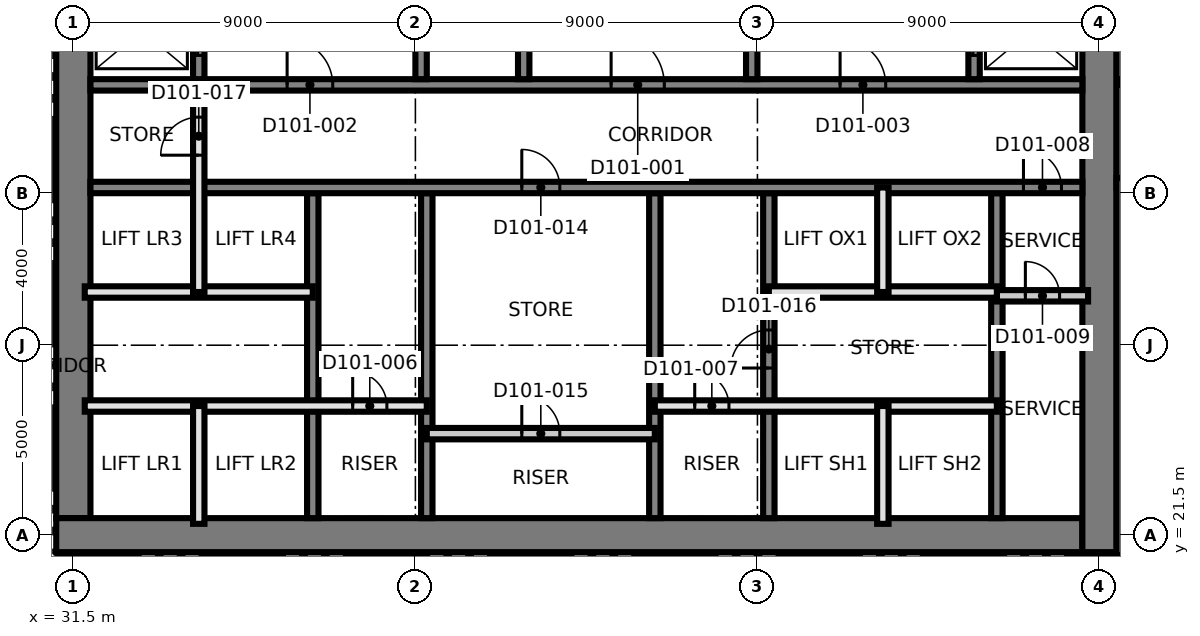
"""IFC4 building model, lengths in metres.
Left out: names, types, materials, properties, quantities, classifications, styles, units other than length and angle.
Written with IfcOpenShell. Run it as: python <this file> out.ifc"""

import sys

from ifc_helpers import new_model, si_unit, direction, frame, frame_2d, origin, place, context, subcontext, project, spatial, rectangle, extrude, element, fill, save


model = new_model("IFC4")
c1 = context("Model", 3, precision=1e-05, world=origin(), true_north=direction((0.0, 1.0)))
c2 = subcontext(c1, "Body", "Model", "MODEL_VIEW")
j1 = project(units=[si_unit("LENGTHUNIT", "METRE"), si_unit("PLANEANGLEUNIT", "RADIAN")], contexts=[c1])
p1 = place(None, origin())
s1 = spatial("IfcSite", under=j1, at=p1, CompositionType="ELEMENT")
p2 = place(p1, origin())
s2 = spatial("IfcBuilding", under=s1, at=p2, CompositionType="ELEMENT")
p3 = place(p2, frame((0.0, 0.0, -4.5)))
s3 = spatial("IfcBuildingStorey", under=s2, at=p3, CompositionType="ELEMENT", Elevation=-4.5)
p4 = place(p3, frame((31.5, 21.95, 0.0), z_axis=(0.0, 0.0, 1.0), x_axis=(0.0, 1.0, 0.0)))
e1 = element("IfcWall", 1, at=p4, inside=s3, PredefinedType="SHEAR", context=c2, shape_type="SweptSolid", body=[
    extrude(rectangle(XDim=17.1, YDim=0.9, at=frame_2d((8.55, 0.0))), origin(), (0.0, 0.0, 1.0), 4.5),
])
p5 = place(p3, frame((31.05, 21.5, 0.0), z_axis=(0.0, 0.0, 1.0), x_axis=(1.0, 0.0, 0.0)))
e2 = element("IfcWall", 2, at=p5, inside=s3, PredefinedType="SHEAR", context=c2, shape_type="SweptSolid", body=[
    extrude(rectangle(XDim=27.0, YDim=0.9, at=frame_2d((13.5, 0.0))), origin(), (0.0, 0.0, 1.0), 4.5),
])
p6 = place(p3, frame((58.5, 21.05, 0.0), z_axis=(0.0, 0.0, 1.0), x_axis=(0.0, 1.0, 0.0)))
e3 = element("IfcWall", 3, at=p6, inside=s3, PredefinedType="SHEAR", context=c2, shape_type="SweptSolid", body=[
    extrude(rectangle(XDim=18.9, YDim=0.9, at=frame_2d((9.45, 0.0))), origin(), (0.0, 0.0, 1.0), 4.5),
])
for number, where, z_axis, x_axis in (
    (4, (37.8, 21.95, 0.0), (0.0, 0.0, 1.0), (0.0, 1.0, 0.0)),
    (5, (40.8, 21.95, 0.0), (0.0, 0.0, 1.0), (0.0, 1.0, 0.0)),
    (6, (46.8, 21.95, 0.0), (0.0, 0.0, 1.0), (0.0, 1.0, 0.0)),
):
    element("IfcWall", number, at=place(p3, frame(where, z_axis=z_axis, x_axis=x_axis)), inside=s3, PredefinedType="SHEAR", context=c2, shape_type="SweptSolid", body=[
        extrude(rectangle(XDim=8.55, YDim=0.3, at=frame_2d((4.275, 0.0))), origin(), (0.0, 0.0, 1.0), 4.5),
    ])
p7 = place(p3, frame((49.8, 21.95, 0.0), z_axis=(0.0, 0.0, 1.0), x_axis=(0.0, 1.0, 0.0)))
e7 = element("IfcWall", 7, at=p7, inside=s3, PredefinedType="SHEAR", context=c2, shape_type="SweptSolid", body=[
    extrude(rectangle(XDim=8.55, YDim=0.3, at=frame_2d((4.275, 0.0))), origin(), (0.0, 0.0, 1.0), 4.5),
])
p8 = place(p7, frame((3.95, 0.0, 0.0)))
e8 = element("IfcOpeningElement", 8, at=p8, cuts=e7, PredefinedType="OPENING", context=c2, shape_type="SweptSolid", body=[
    extrude(rectangle(XDim=1.0, YDim=2.1, at=frame_2d((0.5, 1.05))), frame((0.0, 0.16, 0.0), z_axis=(0.0, -1.0, 0.0), x_axis=(1.0, 0.0, 0.0)), (0.0, 0.0, 1.0), 0.32),
])
p9 = place(p3, frame((55.8, 21.95, 0.0), z_axis=(0.0, 0.0, 1.0), x_axis=(0.0, 1.0, 0.0)))
e9 = element("IfcWall", 9, at=p9, inside=s3, PredefinedType="SHEAR", context=c2, shape_type="SweptSolid", body=[
    extrude(rectangle(XDim=8.55, YDim=0.3, at=frame_2d((4.275, 0.0))), origin(), (0.0, 0.0, 1.0), 4.5),
])
p10 = place(p3, frame((31.95, 30.65, 0.0), z_axis=(0.0, 0.0, 1.0), x_axis=(1.0, 0.0, 0.0)))
e10 = element("IfcWall", 10, at=p10, inside=s3, PredefinedType="SHEAR", context=c2, shape_type="SweptSolid", body=[
    extrude(rectangle(XDim=26.1, YDim=0.3, at=frame_2d((13.05, 0.0))), origin(), (0.0, 0.0, 1.0), 4.5),
])
p11 = place(p10, frame((24.55, 0.0, 0.0)))
e11 = element("IfcOpeningElement", 11, at=p11, cuts=e10, PredefinedType="OPENING", context=c2, shape_type="SweptSolid", body=[
    extrude(rectangle(XDim=1.0, YDim=2.1, at=frame_2d((0.5, 1.05))), frame((0.0, 0.16, 0.0), z_axis=(0.0, -1.0, 0.0), x_axis=(1.0, 0.0, 0.0)), (0.0, 0.0, 1.0), 0.32),
])
p12 = place(p10, frame((11.35, 0.0, 0.0)))
e12 = element("IfcOpeningElement", 12, at=p12, cuts=e10, PredefinedType="OPENING", context=c2, shape_type="SweptSolid", body=[
    extrude(rectangle(XDim=1.0, YDim=2.1, at=frame_2d((0.5, 1.05))), frame((0.0, 0.16, 0.0), z_axis=(0.0, -1.0, 0.0), x_axis=(1.0, 0.0, 0.0)), (0.0, 0.0, 1.0), 0.32),
])
p13 = place(p3, frame((31.95, 33.35, 0.0), z_axis=(0.0, 0.0, 1.0), x_axis=(1.0, 0.0, 0.0)))
e13 = element("IfcWall", 13, at=p13, inside=s3, PredefinedType="SHEAR", context=c2, shape_type="SweptSolid", body=[
    extrude(rectangle(XDim=26.1, YDim=0.3, at=frame_2d((13.05, 0.0))), origin(), (0.0, 0.0, 1.0), 4.5),
])
p14 = place(p13, frame((13.7, 0.0, 0.0)))
e14 = element("IfcOpeningElement", 14, at=p14, cuts=e13, PredefinedType="OPENING", context=c2, shape_type="SweptSolid", body=[
    extrude(rectangle(XDim=1.4, YDim=2.1, at=frame_2d((0.7, 1.05))), frame((0.0, 0.16, 0.0), z_axis=(0.0, -1.0, 0.0), x_axis=(1.0, 0.0, 0.0)), (0.0, 0.0, 1.0), 0.32),
])
p15 = place(p13, frame((5.175, 0.0, 0.0)))
e15 = element("IfcOpeningElement", 15, at=p15, cuts=e13, PredefinedType="OPENING", context=c2, shape_type="SweptSolid", body=[
    extrude(rectangle(XDim=1.2, YDim=2.1, at=frame_2d((0.6, 1.05))), frame((0.0, 0.16, 0.0), z_axis=(0.0, -1.0, 0.0), x_axis=(1.0, 0.0, 0.0)), (0.0, 0.0, 1.0), 0.32),
])
p16 = place(p13, frame((19.725, 0.0, 0.0)))
e16 = element("IfcOpeningElement", 16, at=p16, cuts=e13, PredefinedType="OPENING", context=c2, shape_type="SweptSolid", body=[
    extrude(rectangle(XDim=1.2, YDim=2.1, at=frame_2d((0.6, 1.05))), frame((0.0, 0.16, 0.0), z_axis=(0.0, -1.0, 0.0), x_axis=(1.0, 0.0, 0.0)), (0.0, 0.0, 1.0), 0.32),
])
for number, where, z_axis, x_axis in (
    (17, (40.65, 33.5, 0.0), (0.0, 0.0, 1.0), (0.0, 1.0, 0.0)),
    (18, (43.35, 33.5, 0.0), (0.0, 0.0, 1.0), (0.0, 1.0, 0.0)),
):
    element("IfcWall", number, at=place(p3, frame(where, z_axis=z_axis, x_axis=x_axis)), inside=s3, PredefinedType="SHEAR", context=c2, shape_type="SweptSolid", body=[
        extrude(rectangle(XDim=5.55, YDim=0.3, at=frame_2d((2.775, 0.0))), origin(), (0.0, 0.0, 1.0), 4.5),
    ])
p17 = place(p3, frame((34.8, 33.5, 0.0), z_axis=(0.0, 0.0, 1.0), x_axis=(0.0, 1.0, 0.0)))
e19 = element("IfcWall", 19, at=p17, inside=s3, PredefinedType="SHEAR", context=c2, shape_type="SweptSolid", body=[
    extrude(rectangle(XDim=2.55, YDim=0.3, at=frame_2d((1.275, 0.0))), origin(), (0.0, 0.0, 1.0), 4.5),
])
p18 = place(p17, frame((0.625, 0.0, 0.0)))
e20 = element("IfcOpeningElement", 20, at=p18, cuts=e19, PredefinedType="OPENING", context=c2, shape_type="SweptSolid", body=[
    extrude(rectangle(XDim=1.3, YDim=2.4, at=frame_2d((0.65, 1.2))), frame((0.0, 0.16, 0.0), z_axis=(0.0, -1.0, 0.0), x_axis=(1.0, 0.0, 0.0)), (0.0, 0.0, 1.0), 0.32),
])
p19 = place(p3, frame((49.35, 33.5, 0.0), z_axis=(0.0, 0.0, 1.0), x_axis=(0.0, 1.0, 0.0)))
e21 = element("IfcWall", 21, at=p19, inside=s3, PredefinedType="SHEAR", context=c2, shape_type="SweptSolid", body=[
    extrude(rectangle(XDim=5.55, YDim=0.3, at=frame_2d((2.775, 0.0))), origin(), (0.0, 0.0, 1.0), 4.5),
])
p20 = place(p3, frame((55.2, 33.5, 0.0), z_axis=(0.0, 0.0, 1.0), x_axis=(0.0, 1.0, 0.0)))
e22 = element("IfcWall", 22, at=p20, inside=s3, PredefinedType="SHEAR", context=c2, shape_type="SweptSolid", body=[
    extrude(rectangle(XDim=2.55, YDim=0.3, at=frame_2d((1.275, 0.0))), origin(), (0.0, 0.0, 1.0), 4.5),
])
p21 = place(p20, frame((0.625, 0.0, 0.0)))
e23 = element("IfcOpeningElement", 23, at=p21, cuts=e22, PredefinedType="OPENING", context=c2, shape_type="SweptSolid", body=[
    extrude(rectangle(XDim=1.3, YDim=2.4, at=frame_2d((0.65, 1.2))), frame((0.0, 0.16, 0.0), z_axis=(0.0, -1.0, 0.0), x_axis=(1.0, 0.0, 0.0)), (0.0, 0.0, 1.0), 0.32),
])
p22 = place(p3, frame((40.8, 24.173, 0.0), z_axis=(0.0, 0.0, 1.0), x_axis=(1.0, 0.0, 0.0)))
e24 = element("IfcWall", 24, at=p22, inside=s3, PredefinedType="PARTITIONING", context=c2, shape_type="SweptSolid", body=[
    extrude(rectangle(XDim=6.0, YDim=0.3, at=frame_2d((3.0, 0.0))), origin(), (0.0, 0.0, 1.0), 4.2),
])
p23 = place(p22, frame((2.5, 0.0, 0.0)))
e25 = element("IfcOpeningElement", 25, at=p23, cuts=e24, PredefinedType="OPENING", context=c2, shape_type="SweptSolid", body=[
    extrude(rectangle(XDim=1.0, YDim=2.1, at=frame_2d((0.5, 1.05))), frame((0.0, 0.16, 0.0), z_axis=(0.0, -1.0, 0.0), x_axis=(1.0, 0.0, 0.0)), (0.0, 0.0, 1.0), 0.32),
])
p24 = place(p3, frame((31.8, 24.9, 0.0), z_axis=(0.0, 0.0, 1.0), x_axis=(1.0, 0.0, 0.0)))
e26 = element("IfcWall", 26, at=p24, inside=s3, PredefinedType="SOLIDWALL", context=c2, shape_type="SweptSolid", body=[
    extrude(rectangle(XDim=9.0, YDim=0.3, at=frame_2d((4.5, 0.0))), origin(), (0.0, 0.0, 1.0), 4.2),
])
p25 = place(p24, frame((7.05, 0.0, 0.0)))
e27 = element("IfcOpeningElement", 27, at=p25, cuts=e26, PredefinedType="OPENING", context=c2, shape_type="SweptSolid", body=[
    extrude(rectangle(XDim=0.9, YDim=2.1, at=frame_2d((0.45, 1.05))), frame((0.0, 0.16, 0.0), z_axis=(0.0, -1.0, 0.0), x_axis=(1.0, 0.0, 0.0)), (0.0, 0.0, 1.0), 0.32),
])
p26 = place(p3, frame((46.8, 24.9, 0.0), z_axis=(0.0, 0.0, 1.0), x_axis=(1.0, 0.0, 0.0)))
e28 = element("IfcWall", 28, at=p26, inside=s3, PredefinedType="SOLIDWALL", context=c2, shape_type="SweptSolid", body=[
    extrude(rectangle(XDim=9.0, YDim=0.3, at=frame_2d((4.5, 0.0))), origin(), (0.0, 0.0, 1.0), 4.2),
])
p27 = place(p26, frame((1.05, 0.0, 0.0)))
e29 = element("IfcOpeningElement", 29, at=p27, cuts=e28, PredefinedType="OPENING", context=c2, shape_type="SweptSolid", body=[
    extrude(rectangle(XDim=0.9, YDim=2.1, at=frame_2d((0.45, 1.05))), frame((0.0, 0.16, 0.0), z_axis=(0.0, -1.0, 0.0), x_axis=(1.0, 0.0, 0.0)), (0.0, 0.0, 1.0), 0.32),
])
p28 = place(p3, frame((55.8, 27.8, 0.0), z_axis=(0.0, 0.0, 1.0), x_axis=(1.0, 0.0, 0.0)))
e30 = element("IfcWall", 30, at=p28, inside=s3, PredefinedType="PARTITIONING", context=c2, shape_type="SweptSolid", body=[
    extrude(rectangle(XDim=2.4, YDim=0.3, at=frame_2d((1.2, 0.0))), origin(), (0.0, 0.0, 1.0), 4.2),
])
p29 = place(p28, frame((0.75, 0.0, 0.0)))
e31 = element("IfcOpeningElement", 31, at=p29, cuts=e30, PredefinedType="OPENING", context=c2, shape_type="SweptSolid", body=[
    extrude(rectangle(XDim=0.9, YDim=2.1, at=frame_2d((0.45, 1.05))), frame((0.0, 0.16, 0.0), z_axis=(0.0, -1.0, 0.0), x_axis=(1.0, 0.0, 0.0)), (0.0, 0.0, 1.0), 0.32),
])
for number, where, z_axis, x_axis in (
    (32, (31.8, 27.9, 0.0), (0.0, 0.0, 1.0), (1.0, 0.0, 0.0)),
    (33, (49.8, 27.9, 0.0), (0.0, 0.0, 1.0), (1.0, 0.0, 0.0)),
):
    element("IfcWall", number, at=place(p3, frame(where, z_axis=z_axis, x_axis=x_axis)), inside=s3, PredefinedType="SOLIDWALL", context=c2, shape_type="SweptSolid", body=[
        extrude(rectangle(XDim=6.0, YDim=0.3, at=frame_2d((3.0, 0.0))), origin(), (0.0, 0.0, 1.0), 4.2),
    ])
p30 = place(p3, frame((34.8, 21.8, 0.0), z_axis=(0.0, 0.0, 1.0), x_axis=(0.0, 1.0, 0.0)))
e34 = element("IfcWall", 34, at=p30, inside=s3, PredefinedType="SOLIDWALL", context=c2, shape_type="SweptSolid", body=[
    extrude(rectangle(XDim=3.1, YDim=0.3, at=frame_2d((1.55, 0.0))), origin(), (0.0, 0.0, 1.0), 4.2),
])
p31 = place(p3, frame((34.8, 27.9, 0.0), z_axis=(0.0, 0.0, 1.0), x_axis=(0.0, 1.0, 0.0)))
e35 = element("IfcWall", 35, at=p31, inside=s3, PredefinedType="SOLIDWALL", context=c2, shape_type="SweptSolid", body=[
    extrude(rectangle(XDim=5.45, YDim=0.3, at=frame_2d((2.725, 0.0))), origin(), (0.0, 0.0, 1.0), 4.2),
])
p32 = place(p31, frame((3.6, 0.0, 0.0)))
e36 = element("IfcOpeningElement", 36, at=p32, cuts=e35, PredefinedType="OPENING", context=c2, shape_type="SweptSolid", body=[
    extrude(rectangle(XDim=1.0, YDim=2.1, at=frame_2d((0.5, 1.05))), frame((0.0, 0.16, 0.0), z_axis=(0.0, -1.0, 0.0), x_axis=(1.0, 0.0, 0.0)), (0.0, 0.0, 1.0), 0.32),
])
p33 = place(p3, frame((52.8, 21.8, 0.0), z_axis=(0.0, 0.0, 1.0), x_axis=(0.0, 1.0, 0.0)))
e37 = element("IfcWall", 37, at=p33, inside=s3, PredefinedType="SOLIDWALL", context=c2, shape_type="SweptSolid", body=[
    extrude(rectangle(XDim=3.1, YDim=0.3, at=frame_2d((1.55, 0.0))), origin(), (0.0, 0.0, 1.0), 4.2),
])
p34 = place(p3, frame((52.8, 27.9, 0.0), z_axis=(0.0, 0.0, 1.0), x_axis=(0.0, 1.0, 0.0)))
e38 = element("IfcWall", 38, at=p34, inside=s3, PredefinedType="SOLIDWALL", context=c2, shape_type="SweptSolid", body=[
    extrude(rectangle(XDim=2.75, YDim=0.3, at=frame_2d((1.375, 0.0))), origin(), (0.0, 0.0, 1.0), 4.2),
])
p35 = place(p3, frame((59.1, 30.65, 0.0), z_axis=(0.0, 0.0, 1.0), x_axis=(0.0, 1.0, 0.0)))
e39 = element("IfcWall", 39, at=p35, inside=s3, PredefinedType="PARTITIONING", context=c2, shape_type="SweptSolid", body=[
    extrude(rectangle(XDim=2.7, YDim=0.3, at=frame_2d((1.35, 0.0))), origin(), (0.0, 0.0, 1.0), 4.2),
])
p36 = place(p3, frame((31.15, 20.95, 0.0), z_axis=(0.0, 0.0, 1.0), x_axis=(1.0, 0.0, 0.0)))
e40 = element("IfcWall", 40, at=p36, inside=s3, PredefinedType="PARTITIONING", context=c2, shape_type="SweptSolid", body=[
    extrude(rectangle(XDim=27.9, YDim=0.2, at=frame_2d((13.95, 0.0))), origin(), (0.0, 0.0, 1.0), 4.2),
])
p37 = place(p3, frame((59.05, 20.95, 0.0), z_axis=(0.0, 0.0, 1.0), x_axis=(0.0, 1.0, 0.0)))
e41 = element("IfcWall", 41, at=p37, inside=s3, PredefinedType="PARTITIONING", context=c2, shape_type="SweptSolid", body=[
    extrude(rectangle(XDim=9.95, YDim=0.2, at=frame_2d((4.975, 0.0))), origin(), (0.0, 0.0, 1.0), 4.2),
])
p38 = place(p3, frame((59.05, 33.5, 0.0), z_axis=(0.0, 0.0, 1.0), x_axis=(0.0, 1.0, 0.0)))
e42 = element("IfcWall", 42, at=p38, inside=s3, PredefinedType="PARTITIONING", context=c2, shape_type="SweptSolid", body=[
    extrude(rectangle(XDim=6.35, YDim=0.2, at=frame_2d((3.175, 0.0))), origin(), (0.0, 0.0, 1.0), 4.2),
])
p39 = place(p14, origin())
e43 = element("IfcDoor", 43, at=p39, inside=s3, OperationType="SINGLE_SWING_RIGHT", PredefinedType="DOOR", context=c2, shape_type="SweptSolid", body=[
    extrude(rectangle(XDim=1.4, YDim=2.1, at=frame_2d((0.7, 1.05))), frame((0.0, 0.025, 0.0), z_axis=(0.0, -1.0, 0.0), x_axis=(1.0, 0.0, 0.0)), (0.0, 0.0, 1.0), 0.05),
])
fill(e14, e43)
p40 = place(p15, origin())
e44 = element("IfcDoor", 44, at=p40, inside=s3, OperationType="SINGLE_SWING_LEFT", PredefinedType="DOOR", context=c2, shape_type="SweptSolid", body=[
    extrude(rectangle(XDim=1.2, YDim=2.1, at=frame_2d((0.6, 1.05))), frame((0.0, 0.025, 0.0), z_axis=(0.0, -1.0, 0.0), x_axis=(1.0, 0.0, 0.0)), (0.0, 0.0, 1.0), 0.05),
])
fill(e15, e44)
p41 = place(p16, origin())
e45 = element("IfcDoor", 45, at=p41, inside=s3, OperationType="SINGLE_SWING_RIGHT", PredefinedType="DOOR", context=c2, shape_type="SweptSolid", body=[
    extrude(rectangle(XDim=1.2, YDim=2.1, at=frame_2d((0.6, 1.05))), frame((0.0, 0.025, 0.0), z_axis=(0.0, -1.0, 0.0), x_axis=(1.0, 0.0, 0.0)), (0.0, 0.0, 1.0), 0.05),
])
fill(e16, e45)
p42 = place(p25, origin())
e46 = element("IfcDoor", 46, at=p42, inside=s3, OperationType="SINGLE_SWING_LEFT", PredefinedType="DOOR", context=c2, shape_type="SweptSolid", body=[
    extrude(rectangle(XDim=0.9, YDim=2.1, at=frame_2d((0.45, 1.05))), frame((0.0, 0.025, 0.0), z_axis=(0.0, -1.0, 0.0), x_axis=(1.0, 0.0, 0.0)), (0.0, 0.0, 1.0), 0.05),
])
fill(e27, e46)
p43 = place(p27, origin())
e47 = element("IfcDoor", 47, at=p43, inside=s3, OperationType="SINGLE_SWING_RIGHT", PredefinedType="DOOR", context=c2, shape_type="SweptSolid", body=[
    extrude(rectangle(XDim=0.9, YDim=2.1, at=frame_2d((0.45, 1.05))), frame((0.0, 0.025, 0.0), z_axis=(0.0, -1.0, 0.0), x_axis=(1.0, 0.0, 0.0)), (0.0, 0.0, 1.0), 0.05),
])
fill(e29, e47)
p44 = place(p11, origin())
e48 = element("IfcDoor", 48, at=p44, inside=s3, OperationType="SINGLE_SWING_LEFT", PredefinedType="DOOR", context=c2, shape_type="SweptSolid", body=[
    extrude(rectangle(XDim=1.0, YDim=2.1, at=frame_2d((0.5, 1.05))), frame((0.0, 0.025, 0.0), z_axis=(0.0, -1.0, 0.0), x_axis=(1.0, 0.0, 0.0)), (0.0, 0.0, 1.0), 0.05),
])
fill(e11, e48)
p45 = place(p29, origin())
e49 = element("IfcDoor", 49, at=p45, inside=s3, OperationType="SINGLE_SWING_RIGHT", PredefinedType="DOOR", context=c2, shape_type="SweptSolid", body=[
    extrude(rectangle(XDim=0.9, YDim=2.1, at=frame_2d((0.45, 1.05))), frame((0.0, 0.025, 0.0), z_axis=(0.0, -1.0, 0.0), x_axis=(1.0, 0.0, 0.0)), (0.0, 0.0, 1.0), 0.05),
])
fill(e31, e49)
p46 = place(p18, origin())
e50 = element("IfcDoor", 50, at=p46, inside=s3, OperationType="SLIDING_TO_LEFT", PredefinedType="DOOR", context=c2, shape_type="SweptSolid", body=[
    extrude(rectangle(XDim=1.3, YDim=2.4, at=frame_2d((0.65, 1.2))), frame((0.0, 0.025, 0.0), z_axis=(0.0, -1.0, 0.0), x_axis=(1.0, 0.0, 0.0)), (0.0, 0.0, 1.0), 0.05),
])
fill(e20, e50)
p47 = place(p21, origin())
e51 = element("IfcDoor", 51, at=p47, inside=s3, OperationType="SLIDING_TO_LEFT", PredefinedType="DOOR", context=c2, shape_type="SweptSolid", body=[
    extrude(rectangle(XDim=1.3, YDim=2.4, at=frame_2d((0.65, 1.2))), frame((0.0, 0.025, 0.0), z_axis=(0.0, -1.0, 0.0), x_axis=(1.0, 0.0, 0.0)), (0.0, 0.0, 1.0), 0.05),
])
fill(e23, e51)
p48 = place(p12, origin())
e52 = element("IfcDoor", 52, at=p48, inside=s3, OperationType="SINGLE_SWING_LEFT", PredefinedType="DOOR", context=c2, shape_type="SweptSolid", body=[
    extrude(rectangle(XDim=1.0, YDim=2.1, at=frame_2d((0.5, 1.05))), frame((0.0, 0.025, 0.0), z_axis=(0.0, -1.0, 0.0), x_axis=(1.0, 0.0, 0.0)), (0.0, 0.0, 1.0), 0.05),
])
fill(e12, e52)
p49 = place(p23, origin())
e53 = element("IfcDoor", 53, at=p49, inside=s3, OperationType="SINGLE_SWING_RIGHT", PredefinedType="DOOR", context=c2, shape_type="SweptSolid", body=[
    extrude(rectangle(XDim=1.0, YDim=2.1, at=frame_2d((0.5, 1.05))), frame((0.0, 0.025, 0.0), z_axis=(0.0, -1.0, 0.0), x_axis=(1.0, 0.0, 0.0)), (0.0, 0.0, 1.0), 0.05),
])
fill(e25, e53)
p50 = place(p8, origin())
e54 = element("IfcDoor", 54, at=p50, inside=s3, OperationType="SINGLE_SWING_LEFT", PredefinedType="DOOR", context=c2, shape_type="SweptSolid", body=[
    extrude(rectangle(XDim=1.0, YDim=2.1, at=frame_2d((0.5, 1.05))), frame((0.0, 0.025, 0.0), z_axis=(0.0, -1.0, 0.0), x_axis=(1.0, 0.0, 0.0)), (0.0, 0.0, 1.0), 0.05),
])
fill(e8, e54)
p51 = place(p32, origin())
e55 = element("IfcDoor", 55, at=p51, inside=s3, OperationType="SINGLE_SWING_RIGHT", PredefinedType="DOOR", context=c2, shape_type="SweptSolid", body=[
    extrude(rectangle(XDim=1.0, YDim=2.1, at=frame_2d((0.5, 1.05))), frame((0.0, 0.025, 0.0), z_axis=(0.0, -1.0, 0.0), x_axis=(1.0, 0.0, 0.0)), (0.0, 0.0, 1.0), 0.05),
])
fill(e36, e55)
save(model, sys.argv[1])
